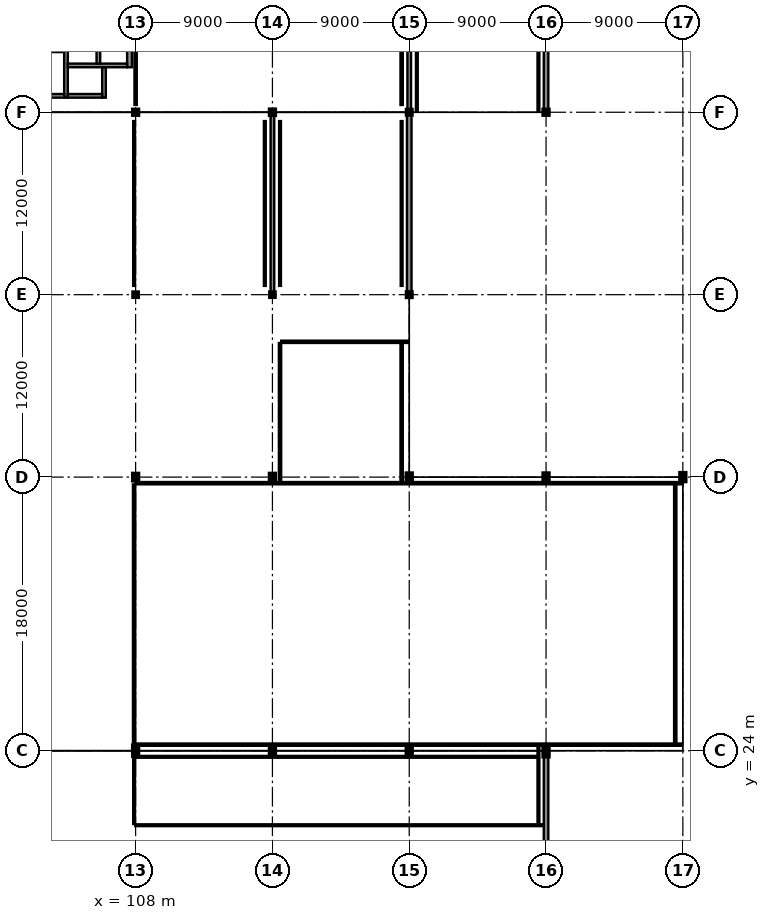
"""IFC4 building model, lengths in metres.
Left out: names, types, materials, properties, quantities, classifications, styles, units other than length and angle.
Written with IfcOpenShell. Run it as: python <this file> out.ifc"""

import sys

from ifc_helpers import new_model, si_unit, direction, frame, frame_2d, origin, origin_2d, place, context, subcontext, project, spatial, rectangle, i_section, extrude, element, fill, save


model = new_model("IFC4")
c1 = context("Model", 3, precision=1e-05, world=origin(), true_north=direction((0.0, 1.0)))
c2 = subcontext(c1, "Body", "Model", "MODEL_VIEW")
j1 = project(units=[si_unit("LENGTHUNIT", "METRE"), si_unit("PLANEANGLEUNIT", "RADIAN")], contexts=[c1])
p1 = place(None, origin())
s1 = spatial("IfcSite", under=j1, at=p1, CompositionType="ELEMENT")
p2 = place(p1, origin())
s2 = spatial("IfcBuilding", under=s1, at=p2, CompositionType="ELEMENT")
p3 = place(p2, frame((0.0, 0.0, 9.9)))
s3 = spatial("IfcBuildingStorey", under=s2, at=p3, CompositionType="ELEMENT", Elevation=9.9)
p4 = place(p3, frame((108.0, 24.0, 0.0), z_axis=(0.0, 0.0, 1.0), x_axis=(1.0, 0.0, 0.0)))
e1 = element("IfcColumn", 1, at=p4, inside=s3, PredefinedType="COLUMN", context=c2, shape_type="SweptSolid", body=[
    extrude(i_section(OverallWidth=0.3, OverallDepth=0.65, WebThickness=0.016, FlangeThickness=0.031, at=origin_2d()), origin(), (0.0, 0.0, 1.0), 4.5),
])
p5 = place(p3, frame((108.0, 42.0, 0.0), z_axis=(0.0, 0.0, 1.0), x_axis=(1.0, 0.0, 0.0)))
e2 = element("IfcColumn", 2, at=p5, inside=s3, PredefinedType="COLUMN", context=c2, shape_type="SweptSolid", body=[
    extrude(i_section(OverallWidth=0.3, OverallDepth=0.4, WebThickness=0.013, FlangeThickness=0.024, at=origin_2d()), origin(), (0.0, 0.0, 1.0), 4.3),
])
p6 = place(p3, frame((108.0, 54.0, 0.0), z_axis=(0.0, 0.0, 1.0), x_axis=(1.0, 0.0, 0.0)))
e3 = element("IfcColumn", 3, at=p6, inside=s3, PredefinedType="COLUMN", context=c2, shape_type="SweptSolid", body=[
    extrude(i_section(OverallWidth=0.26, OverallDepth=0.26, WebThickness=0.01, FlangeThickness=0.018, at=origin_2d()), origin(), (0.0, 0.0, 1.0), 4.3),
])
p7 = place(p3, frame((108.0, 66.0, 0.0), z_axis=(0.0, 0.0, 1.0), x_axis=(1.0, 0.0, 0.0)))
e4 = element("IfcColumn", 4, at=p7, inside=s3, PredefinedType="COLUMN", context=c2, shape_type="SweptSolid", body=[
    extrude(i_section(OverallWidth=0.3, OverallDepth=0.3, WebThickness=0.011, FlangeThickness=0.019, at=origin_2d()), origin(), (0.0, 0.0, 1.0), 4.5),
])
p8 = place(p3, frame((117.0, 24.0, 0.0), z_axis=(0.0, 0.0, 1.0), x_axis=(1.0, 0.0, 0.0)))
e5 = element("IfcColumn", 5, at=p8, inside=s3, PredefinedType="COLUMN", context=c2, shape_type="SweptSolid", body=[
    extrude(i_section(OverallWidth=0.3, OverallDepth=0.65, WebThickness=0.016, FlangeThickness=0.031, at=origin_2d()), origin(), (0.0, 0.0, 1.0), 4.5),
])
p9 = place(p3, frame((117.0, 42.0, 0.0), z_axis=(0.0, 0.0, 1.0), x_axis=(0.0, 1.0, 0.0)))
e6 = element("IfcColumn", 6, at=p9, inside=s3, PredefinedType="COLUMN", context=c2, shape_type="SweptSolid", body=[
    extrude(i_section(OverallWidth=0.3, OverallDepth=0.4, WebThickness=0.013, FlangeThickness=0.024, at=origin_2d()), origin(), (0.0, 0.0, 1.0), 4.3),
])
p10 = place(p3, frame((117.0, 54.0, 0.0), z_axis=(0.0, 0.0, 1.0), x_axis=(1.0, 0.0, 0.0)))
e7 = element("IfcColumn", 7, at=p10, inside=s3, PredefinedType="COLUMN", context=c2, shape_type="SweptSolid", body=[
    extrude(i_section(OverallWidth=0.26, OverallDepth=0.26, WebThickness=0.01, FlangeThickness=0.018, at=origin_2d()), origin(), (0.0, 0.0, 1.0), 4.3),
])
p11 = place(p3, frame((117.0, 66.0, 0.0), z_axis=(0.0, 0.0, 1.0), x_axis=(1.0, 0.0, 0.0)))
e8 = element("IfcColumn", 8, at=p11, inside=s3, PredefinedType="COLUMN", context=c2, shape_type="SweptSolid", body=[
    extrude(i_section(OverallWidth=0.3, OverallDepth=0.32, WebThickness=0.011, FlangeThickness=0.021, at=origin_2d()), origin(), (0.0, 0.0, 1.0), 4.5),
])
p12 = place(p3, frame((126.0, 24.0, 0.0), z_axis=(0.0, 0.0, 1.0), x_axis=(1.0, 0.0, 0.0)))
e9 = element("IfcColumn", 9, at=p12, inside=s3, PredefinedType="COLUMN", context=c2, shape_type="SweptSolid", body=[
    extrude(i_section(OverallWidth=0.3, OverallDepth=0.65, WebThickness=0.016, FlangeThickness=0.031, at=origin_2d()), origin(), (0.0, 0.0, 1.0), 4.5),
])
p13 = place(p3, frame((126.0, 42.0, 0.0), z_axis=(0.0, 0.0, 1.0), x_axis=(1.0, 0.0, 0.0)))
e10 = element("IfcColumn", 10, at=p13, inside=s3, PredefinedType="COLUMN", context=c2, shape_type="SweptSolid", body=[
    extrude(i_section(OverallWidth=0.3, OverallDepth=0.45, WebThickness=0.014, FlangeThickness=0.026, at=origin_2d()), origin(), (0.0, 0.0, 1.0), 4.3),
])
p14 = place(p3, frame((126.0, 54.0, 0.0), z_axis=(0.0, 0.0, 1.0), x_axis=(1.0, 0.0, 0.0)))
e11 = element("IfcColumn", 11, at=p14, inside=s3, PredefinedType="COLUMN", context=c2, shape_type="SweptSolid", body=[
    extrude(i_section(OverallWidth=0.28, OverallDepth=0.28, WebThickness=0.01, FlangeThickness=0.018, at=origin_2d()), origin(), (0.0, 0.0, 1.0), 4.3),
])
p15 = place(p3, frame((126.0, 66.0, 0.0), z_axis=(0.0, 0.0, 1.0), x_axis=(0.0, 1.0, 0.0)))
e12 = element("IfcColumn", 12, at=p15, inside=s3, PredefinedType="COLUMN", context=c2, shape_type="SweptSolid", body=[
    extrude(i_section(OverallWidth=0.28, OverallDepth=0.28, WebThickness=0.01, FlangeThickness=0.018, at=origin_2d()), origin(), (0.0, 0.0, 1.0), 4.5),
])
p16 = place(p3, frame((135.0, 24.0, 0.0), z_axis=(0.0, 0.0, 1.0), x_axis=(1.0, 0.0, 0.0)))
e13 = element("IfcColumn", 13, at=p16, inside=s3, PredefinedType="COLUMN", context=c2, shape_type="SweptSolid", body=[
    extrude(i_section(OverallWidth=0.304, OverallDepth=0.716, WebThickness=0.021, FlangeThickness=0.04, at=origin_2d()), origin(), (0.0, 0.0, 1.0), 4.5),
])
p17 = place(p3, frame((135.0, 42.0, 0.0), z_axis=(0.0, 0.0, 1.0), x_axis=(1.0, 0.0, 0.0)))
e14 = element("IfcColumn", 14, at=p17, inside=s3, PredefinedType="COLUMN", context=c2, shape_type="SweptSolid", body=[
    extrude(i_section(OverallWidth=0.3, OverallDepth=0.45, WebThickness=0.014, FlangeThickness=0.026, at=origin_2d()), origin(), (0.0, 0.0, 1.0), 4.5),
])
p18 = place(p3, frame((135.0, 66.0, 0.0), z_axis=(0.0, 0.0, 1.0), x_axis=(1.0, 0.0, 0.0)))
e15 = element("IfcColumn", 15, at=p18, inside=s3, PredefinedType="COLUMN", context=c2, shape_type="SweptSolid", body=[
    extrude(i_section(OverallWidth=0.3, OverallDepth=0.3, WebThickness=0.011, FlangeThickness=0.019, at=origin_2d()), origin(), (0.0, 0.0, 1.0), 4.5),
])
p19 = place(p3, frame((144.0, 42.0, 0.0), z_axis=(0.0, 0.0, 1.0), x_axis=(1.0, 0.0, 0.0)))
e16 = element("IfcColumn", 16, at=p19, inside=s3, PredefinedType="COLUMN", context=c2, shape_type="SweptSolid", body=[
    extrude(i_section(OverallWidth=0.3, OverallDepth=0.5, WebThickness=0.014, FlangeThickness=0.028, at=origin_2d()), origin(), (0.0, 0.0, 1.0), 4.5),
])
p20 = place(p3, frame((135.0, 66.148, 0.0), z_axis=(0.0, 0.0, 1.0), x_axis=(0.0, 1.0, 0.0)))
e17 = element("IfcWall", 17, at=p20, inside=s3, PredefinedType="SOLIDWALL", context=c2, shape_type="SweptSolid", body=[
    extrude(rectangle(XDim=11.579, YDim=0.3, at=frame_2d((5.79, 0.0))), origin(), (0.0, 0.0, 1.0), 3.845),
])
p21 = place(p20, frame((2.242, 0.0, 0.8)))
e18 = element("IfcOpeningElement", 18, at=p21, cuts=e17, PredefinedType="OPENING", context=c2, shape_type="SweptSolid", body=[
    extrude(rectangle(XDim=2.0, YDim=2.0, at=frame_2d((1.0, 1.0))), frame((0.0, 0.165, 0.0), z_axis=(0.0, -1.0, 0.0), x_axis=(1.0, 0.0, 0.0)), (0.0, 0.0, 1.0), 0.33),
])
p22 = place(p20, frame((7.337, 0.0, 0.8)))
e19 = element("IfcOpeningElement", 19, at=p22, cuts=e17, PredefinedType="OPENING", context=c2, shape_type="SweptSolid", body=[
    extrude(rectangle(XDim=2.0, YDim=2.0, at=frame_2d((1.0, 1.0))), frame((0.0, 0.165, 0.0), z_axis=(0.0, -1.0, 0.0), x_axis=(1.0, 0.0, 0.0)), (0.0, 0.0, 1.0), 0.33),
])
p23 = place(p3, frame((126.0, 54.138, 0.0), z_axis=(0.0, 0.0, 1.0), x_axis=(0.0, 1.0, 0.0)))
e20 = element("IfcWall", 20, at=p23, inside=s3, PredefinedType="SOLIDWALL", context=c2, shape_type="SweptSolid", body=[
    extrude(rectangle(XDim=11.854, YDim=0.3, at=frame_2d((5.927, 0.0))), origin(), (0.0, 0.0, 1.0), 3.695),
])
p24 = place(p3, frame((135.0, 12.308, 0.0), z_axis=(0.0, 0.0, 1.0), x_axis=(0.0, 1.0, 0.0)))
e21 = element("IfcWall", 21, at=p24, inside=s3, PredefinedType="SOLIDWALL", context=c2, shape_type="SweptSolid", body=[
    extrude(rectangle(XDim=11.336, YDim=0.3, at=frame_2d((5.668, 0.0))), origin(), (0.0, 0.0, 1.0), 3.825),
])
p25 = place(p24, frame((3.732, 0.0, 0.8)))
e22 = element("IfcOpeningElement", 22, at=p25, cuts=e21, PredefinedType="OPENING", context=c2, shape_type="SweptSolid", body=[
    extrude(rectangle(XDim=2.0, YDim=2.0, at=frame_2d((1.0, 1.0))), frame((0.0, 0.165, 0.0), z_axis=(0.0, -1.0, 0.0), x_axis=(1.0, 0.0, 0.0)), (0.0, 0.0, 1.0), 0.33),
])
p26 = place(p24, frame((7.162, 0.0, 0.8)))
e23 = element("IfcOpeningElement", 23, at=p26, cuts=e21, PredefinedType="OPENING", context=c2, shape_type="SweptSolid", body=[
    extrude(rectangle(XDim=2.0, YDim=2.0, at=frame_2d((1.0, 1.0))), frame((0.0, 0.165, 0.0), z_axis=(0.0, -1.0, 0.0), x_axis=(1.0, 0.0, 0.0)), (0.0, 0.0, 1.0), 0.33),
])
p27 = place(p3, frame((103.42, 66.96, 0.0), z_axis=(0.0, 0.0, 1.0), x_axis=(0.0, 1.0, 0.0)))
e24 = element("IfcWall", 24, at=p27, inside=s3, PredefinedType="SHEAR", context=c2, shape_type="SweptSolid", body=[
    extrude(rectangle(XDim=8.28, YDim=0.24, at=frame_2d((4.14, 0.0))), origin(), (0.0, 0.0, 1.0), 4.31),
])
p28 = place(p27, frame((6.49, 0.0, 0.0)))
e25 = element("IfcOpeningElement", 25, at=p28, cuts=e24, PredefinedType="OPENING", context=c2, shape_type="SweptSolid", body=[
    extrude(rectangle(XDim=1.3, YDim=2.2, at=frame_2d((0.65, 1.1))), frame((0.0, 0.135, 0.0), z_axis=(0.0, -1.0, 0.0), x_axis=(1.0, 0.0, 0.0)), (0.0, 0.0, 1.0), 0.27),
])
p29 = place(p3, frame((99.6, 67.08, 0.0), z_axis=(0.0, 0.0, 1.0), x_axis=(1.0, 0.0, 0.0)))
e26 = element("IfcWall", 26, at=p29, inside=s3, PredefinedType="SHEAR", context=c2, shape_type="SweptSolid", body=[
    extrude(rectangle(XDim=3.7, YDim=0.24, at=frame_2d((1.85, 0.0))), origin(), (0.0, 0.0, 1.0), 4.31),
])
p30 = place(p3, frame((107.6, 68.96, 0.0), z_axis=(0.0, 0.0, 1.0), x_axis=(0.0, 1.0, 0.0)))
e27 = element("IfcWall", 27, at=p30, inside=s3, PredefinedType="SHEAR", context=c2, shape_type="SweptSolid", body=[
    extrude(rectangle(XDim=9.04, YDim=0.32, at=frame_2d((4.52, 0.0))), origin(), (0.0, 0.0, 1.0), 4.16),
])
p31 = place(p3, frame((103.54, 69.08, 0.0), z_axis=(0.0, 0.0, 1.0), x_axis=(1.0, 0.0, 0.0)))
e28 = element("IfcWall", 28, at=p31, inside=s3, PredefinedType="SHEAR", context=c2, shape_type="SweptSolid", body=[
    extrude(rectangle(XDim=3.9, YDim=0.24, at=frame_2d((1.95, 0.0))), origin(), (0.0, 0.0, 1.0), 4.31),
])
p32 = place(p3, frame((105.55, 69.2, 0.0), z_axis=(0.0, 0.0, 1.0), x_axis=(0.0, 1.0, 0.0)))
e29 = element("IfcWall", 29, at=p32, inside=s3, PredefinedType="SHEAR", context=c2, shape_type="SweptSolid", body=[
    extrude(rectangle(XDim=2.9, YDim=0.24, at=frame_2d((1.45, 0.0))), origin(), (0.0, 0.0, 1.0), 4.31),
])
p33 = place(p3, frame((105.92, 66.96, 0.0), z_axis=(0.0, 0.0, 1.0), x_axis=(0.0, 1.0, 0.0)))
e30 = element("IfcWall", 30, at=p33, inside=s3, PredefinedType="SHEAR", context=c2, shape_type="SweptSolid", body=[
    extrude(rectangle(XDim=2.0, YDim=0.24, at=frame_2d((1.0, 0.0))), origin(), (0.0, 0.0, 1.0), 4.31),
])
p34 = place(p3, frame((103.54, 67.08, 0.0), z_axis=(0.0, 0.0, 1.0), x_axis=(1.0, 0.0, 0.0)))
e31 = element("IfcWall", 31, at=p34, inside=s3, PredefinedType="SHEAR", context=c2, shape_type="SweptSolid", body=[
    extrude(rectangle(XDim=2.26, YDim=0.24, at=frame_2d((1.13, 0.0))), origin(), (0.0, 0.0, 1.0), 4.31),
])
p35 = place(p3, frame((126.0, 66.008, 0.0), z_axis=(0.0, 0.0, 1.0), x_axis=(0.0, 1.0, 0.0)))
e32 = element("IfcWall", 32, at=p35, inside=s3, PredefinedType="SHEAR", context=c2, shape_type="SweptSolid", body=[
    extrude(rectangle(XDim=11.719, YDim=0.24, at=frame_2d((5.859, 0.0))), origin(), (0.0, 0.0, 1.0), 3.595),
])
p36 = place(p3, frame((117.0, 54.128, 0.0), z_axis=(0.0, 0.0, 1.0), x_axis=(0.0, 1.0, 0.0)))
e33 = element("IfcWall", 33, at=p36, inside=s3, PredefinedType="SHEAR", context=c2, shape_type="SweptSolid", body=[
    extrude(rectangle(XDim=11.714, YDim=0.24, at=frame_2d((5.857, 0.0))), origin(), (0.0, 0.0, 1.0), 3.745),
])
p37 = place(p3, frame((108.0, 66.48, 0.0), z_axis=(0.0, 0.0, 1.0), x_axis=(0.0, 1.0, 0.0)))
e34 = element("IfcWall", 34, at=p37, inside=s3, PredefinedType="PARTITIONING", context=c2, shape_type="SweptSolid", body=[
    extrude(rectangle(XDim=11.34, YDim=0.15, at=frame_2d((5.67, 0.0))), origin(), (0.0, 0.0, 1.0), 3.705),
])
p38 = place(p3, frame((125.5, 77.82, 0.0), z_axis=(0.0, 0.0, 1.0), x_axis=(0.0, -1.0, 0.0)))
e35 = element("IfcWall", 35, at=p38, inside=s3, PredefinedType="PARTITIONING", context=c2, shape_type="SweptSolid", body=[
    extrude(rectangle(XDim=11.34, YDim=0.15, at=frame_2d((5.67, 0.0))), origin(), (0.0, 0.0, 1.0), 4.14),
])
for number, where, z_axis, x_axis in (
    (36, (126.5, 66.075, 0.0), (0.0, 0.0, 1.0), (0.0, 1.0, 0.0)),
    (37, (134.5, 77.82, 0.0), (0.0, 0.0, 1.0), (0.0, -1.0, 0.0)),
):
    element("IfcWall", number, at=place(p3, frame(where, z_axis=z_axis, x_axis=x_axis)), inside=s3, PredefinedType="PARTITIONING", context=c2, shape_type="SweptSolid", body=[
        extrude(rectangle(XDim=11.745, YDim=0.12, at=frame_2d((5.873, 0.0))), origin(), (0.0, 0.0, 1.0), 4.14),
    ])
p39 = place(p3, frame((143.925, 24.4, 0.0), z_axis=(0.0, 0.0, 1.0), x_axis=(-1.0, 0.0, 0.0)))
e38 = element("IfcWall", 38, at=p39, inside=s3, PredefinedType="PARTITIONING", context=c2, shape_type="SweptSolid", body=[
    extrude(rectangle(XDim=35.945, YDim=0.15, at=frame_2d((17.973, 0.0))), origin(), (0.0, 0.0, 1.0), 4.14),
])
p40 = place(p3, frame((107.9, 24.48, 0.0), z_axis=(0.0, 0.0, 1.0), x_axis=(0.0, 1.0, 0.0)))
e39 = element("IfcWall", 39, at=p40, inside=s3, PredefinedType="PARTITIONING", context=c2, shape_type="SweptSolid", body=[
    extrude(rectangle(XDim=17.04, YDim=0.15, at=frame_2d((8.52, 0.0))), origin(), (0.0, 0.0, 1.0), 3.545),
])
p41 = place(p40, frame((7.995, 0.0, 0.0)))
e40 = element("IfcOpeningElement", 40, at=p41, cuts=e39, PredefinedType="OPENING", context=c2, shape_type="SweptSolid", body=[
    extrude(rectangle(XDim=1.05, YDim=2.25, at=frame_2d((0.525, 1.125))), frame((0.0, 0.09, 0.0), z_axis=(0.0, -1.0, 0.0), x_axis=(1.0, 0.0, 0.0)), (0.0, 0.0, 1.0), 0.18),
])
p42 = place(p3, frame((107.98, 41.6, 0.0), z_axis=(0.0, 0.0, 1.0), x_axis=(1.0, 0.0, 0.0)))
e41 = element("IfcWall", 41, at=p42, inside=s3, PredefinedType="PARTITIONING", context=c2, shape_type="SweptSolid", body=[
    extrude(rectangle(XDim=36.012, YDim=0.15, at=frame_2d((18.006, 0.0))), origin(), (0.0, 0.0, 1.0), 4.14),
])
p43 = place(p3, frame((143.5, 41.53, 0.0), z_axis=(0.0, 0.0, 1.0), x_axis=(0.0, -1.0, 0.0)))
e42 = element("IfcWall", 42, at=p43, inside=s3, PredefinedType="PARTITIONING", context=c2, shape_type="SweptSolid", body=[
    extrude(rectangle(XDim=17.06, YDim=0.15, at=frame_2d((8.53, 0.0))), origin(), (0.0, 0.0, 1.0), 4.14),
])
p44 = place(p3, frame((116.5, 65.42, 0.0), z_axis=(0.0, 0.0, 1.0), x_axis=(0.0, -1.0, 0.0)))
e43 = element("IfcWall", 43, at=p44, inside=s3, PredefinedType="PARTITIONING", context=c2, shape_type="SweptSolid", body=[
    extrude(rectangle(XDim=10.84, YDim=0.12, at=frame_2d((5.42, 0.0))), origin(), (0.0, 0.0, 1.0), 4.14),
])
p45 = place(p3, frame((107.9, 54.58, 0.0), z_axis=(0.0, 0.0, 1.0), x_axis=(0.0, 1.0, 0.0)))
e44 = element("IfcWall", 44, at=p45, inside=s3, PredefinedType="PARTITIONING", context=c2, shape_type="SweptSolid", body=[
    extrude(rectangle(XDim=10.84, YDim=0.12, at=frame_2d((5.42, 0.0))), origin(), (0.0, 0.0, 1.0), 3.805),
])
p46 = place(p45, frame((4.945, 0.0, 0.0)))
e45 = element("IfcOpeningElement", 45, at=p46, cuts=e44, PredefinedType="OPENING", context=c2, shape_type="SweptSolid", body=[
    extrude(rectangle(XDim=0.95, YDim=2.15, at=frame_2d((0.475, 1.075))), frame((0.0, 0.075, 0.0), z_axis=(0.0, -1.0, 0.0), x_axis=(1.0, 0.0, 0.0)), (0.0, 0.0, 1.0), 0.15),
])
for number, where, z_axis, x_axis in (
    (46, (125.5, 50.82, 0.0), (0.0, 0.0, 1.0), (0.0, -1.0, 0.0)),
    (47, (117.5, 41.67, 0.0), (0.0, 0.0, 1.0), (0.0, 1.0, 0.0)),
):
    element("IfcWall", number, at=place(p3, frame(where, z_axis=z_axis, x_axis=x_axis)), inside=s3, PredefinedType="PARTITIONING", context=c2, shape_type="SweptSolid", body=[
        extrude(rectangle(XDim=9.15, YDim=0.15, at=frame_2d((4.575, 0.0))), origin(), (0.0, 0.0, 1.0), 4.14),
    ])
p47 = place(p3, frame((117.58, 50.9, 0.0), z_axis=(0.0, 0.0, 1.0), x_axis=(1.0, 0.0, 0.0)))
e48 = element("IfcWall", 48, at=p47, inside=s3, PredefinedType="PARTITIONING", context=c2, shape_type="SweptSolid", body=[
    extrude(rectangle(XDim=8.345, YDim=0.15, at=frame_2d((4.172, 0.0))), origin(), (0.0, 0.0, 1.0), 4.14),
])
p48 = place(p47, frame((3.647, 0.0, 0.0)))
e49 = element("IfcOpeningElement", 49, at=p48, cuts=e48, PredefinedType="OPENING", context=c2, shape_type="SweptSolid", body=[
    extrude(rectangle(XDim=1.05, YDim=2.25, at=frame_2d((0.525, 1.125))), frame((0.0, 0.09, 0.0), z_axis=(0.0, -1.0, 0.0), x_axis=(1.0, 0.0, 0.0)), (0.0, 0.0, 1.0), 0.18),
])
for number, where, z_axis, x_axis in (
    (50, (125.5, 65.42, 0.0), (0.0, 0.0, 1.0), (0.0, -1.0, 0.0)),
    (51, (117.5, 54.58, 0.0), (0.0, 0.0, 1.0), (0.0, 1.0, 0.0)),
):
    element("IfcWall", number, at=place(p3, frame(where, z_axis=z_axis, x_axis=x_axis)), inside=s3, PredefinedType="PARTITIONING", context=c2, shape_type="SweptSolid", body=[
        extrude(rectangle(XDim=10.84, YDim=0.12, at=frame_2d((5.42, 0.0))), origin(), (0.0, 0.0, 1.0), 4.14),
    ])
p49 = place(p3, frame((134.5, 24.33, 0.0), z_axis=(0.0, 0.0, 1.0), x_axis=(0.0, -1.0, 0.0)))
e52 = element("IfcWall", 52, at=p49, inside=s3, PredefinedType="PARTITIONING", context=c2, shape_type="SweptSolid", body=[
    extrude(rectangle(XDim=5.15, YDim=0.12, at=frame_2d((2.575, 0.0))), origin(), (0.0, 0.0, 1.0), 4.14),
])
p50 = place(p3, frame((134.855, 19.1, 0.0), z_axis=(0.0, 0.0, 1.0), x_axis=(-1.0, 0.0, 0.0)))
e53 = element("IfcWall", 53, at=p50, inside=s3, PredefinedType="PARTITIONING", context=c2, shape_type="SweptSolid", body=[
    extrude(rectangle(XDim=26.875, YDim=0.12, at=frame_2d((13.438, 0.0))), origin(), (0.0, 0.0, 1.0), 4.14),
])
p51 = place(p50, frame((12.988, 0.0, 0.0)))
e54 = element("IfcOpeningElement", 54, at=p51, cuts=e53, PredefinedType="OPENING", context=c2, shape_type="SweptSolid", body=[
    extrude(rectangle(XDim=0.9, YDim=2.1, at=frame_2d((0.45, 1.05))), frame((0.0, 0.075, 0.0), z_axis=(0.0, -1.0, 0.0), x_axis=(1.0, 0.0, 0.0)), (0.0, 0.0, 1.0), 0.15),
])
p52 = place(p3, frame((107.9, 19.18, 0.0), z_axis=(0.0, 0.0, 1.0), x_axis=(0.0, 1.0, 0.0)))
e55 = element("IfcWall", 55, at=p52, inside=s3, PredefinedType="PARTITIONING", context=c2, shape_type="SweptSolid", body=[
    extrude(rectangle(XDim=4.34, YDim=0.12, at=frame_2d((2.17, 0.0))), origin(), (0.0, 0.0, 1.0), 3.685),
])
p53 = place(p3, frame((107.98, 23.6, 0.0), z_axis=(0.0, 0.0, 1.0), x_axis=(1.0, 0.0, 0.0)))
e56 = element("IfcWall", 56, at=p53, inside=s3, PredefinedType="PARTITIONING", context=c2, shape_type="SweptSolid", body=[
    extrude(rectangle(XDim=26.465, YDim=0.12, at=frame_2d((13.232, 0.0))), origin(), (0.0, 0.0, 1.0), 4.14),
])
p54 = place(p21, origin())
e57 = element("IfcWindow", 57, at=p54, inside=s3, PartitioningType="SINGLE_PANEL", PredefinedType="WINDOW", context=c2, shape_type="SweptSolid", body=[
    extrude(rectangle(XDim=2.0, YDim=2.0, at=frame_2d((1.0, 1.0))), frame((0.0, 0.03, 0.0), z_axis=(0.0, -1.0, 0.0), x_axis=(1.0, 0.0, 0.0)), (0.0, 0.0, 1.0), 0.06),
])
fill(e18, e57)
p55 = place(p26, origin())
e58 = element("IfcWindow", 58, at=p55, inside=s3, PartitioningType="SINGLE_PANEL", PredefinedType="WINDOW", context=c2, shape_type="SweptSolid", body=[
    extrude(rectangle(XDim=2.0, YDim=2.0, at=frame_2d((1.0, 1.0))), frame((0.0, 0.03, 0.0), z_axis=(0.0, -1.0, 0.0), x_axis=(1.0, 0.0, 0.0)), (0.0, 0.0, 1.0), 0.06),
])
fill(e23, e58)
p56 = place(p41, frame((1.05, 0.0, 0.0), z_axis=(0.0, 0.0, 1.0), x_axis=(-1.0, 0.0, 0.0)))
e59 = element("IfcDoor", 59, at=p56, inside=s3, OperationType="SINGLE_SWING_LEFT", PredefinedType="DOOR", context=c2, shape_type="SweptSolid", body=[
    extrude(rectangle(XDim=1.05, YDim=2.25, at=frame_2d((0.525, 1.125))), frame((0.0, 0.025, 0.0), z_axis=(0.0, -1.0, 0.0), x_axis=(1.0, 0.0, 0.0)), (0.0, 0.0, 1.0), 0.05),
])
fill(e40, e59)
p57 = place(p46, origin())
e60 = element("IfcDoor", 60, at=p57, inside=s3, OperationType="SINGLE_SWING_RIGHT", PredefinedType="DOOR", context=c2, shape_type="SweptSolid", body=[
    extrude(rectangle(XDim=0.95, YDim=2.15, at=frame_2d((0.475, 1.075))), frame((0.0, 0.025, 0.0), z_axis=(0.0, -1.0, 0.0), x_axis=(1.0, 0.0, 0.0)), (0.0, 0.0, 1.0), 0.05),
])
fill(e45, e60)
p58 = place(p48, frame((1.05, 0.0, 0.0), z_axis=(0.0, 0.0, 1.0), x_axis=(-1.0, 0.0, 0.0)))
e61 = element("IfcDoor", 61, at=p58, inside=s3, OperationType="SINGLE_SWING_LEFT", PredefinedType="DOOR", context=c2, shape_type="SweptSolid", body=[
    extrude(rectangle(XDim=1.05, YDim=2.25, at=frame_2d((0.525, 1.125))), frame((0.0, 0.025, 0.0), z_axis=(0.0, -1.0, 0.0), x_axis=(1.0, 0.0, 0.0)), (0.0, 0.0, 1.0), 0.05),
])
fill(e49, e61)
p59 = place(p51, frame((0.9, 0.0, 0.0), z_axis=(0.0, 0.0, 1.0), x_axis=(-1.0, 0.0, 0.0)))
e62 = element("IfcDoor", 62, at=p59, inside=s3, OperationType="SINGLE_SWING_RIGHT", PredefinedType="DOOR", context=c2, shape_type="SweptSolid", body=[
    extrude(rectangle(XDim=0.9, YDim=2.1, at=frame_2d((0.45, 1.05))), frame((0.0, 0.025, 0.0), z_axis=(0.0, -1.0, 0.0), x_axis=(1.0, 0.0, 0.0)), (0.0, 0.0, 1.0), 0.05),
])
fill(e54, e62)
save(model, sys.argv[1])
